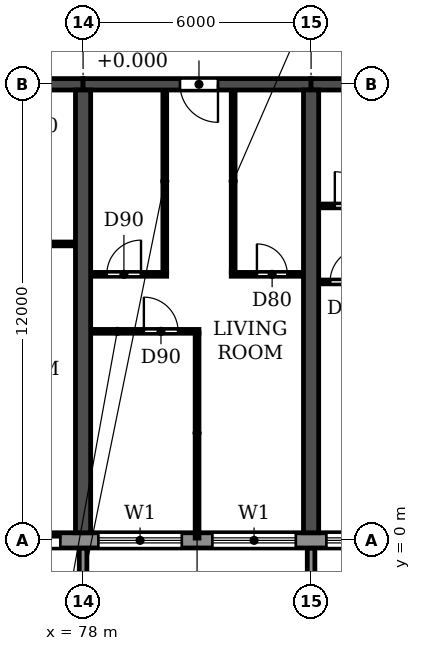
"""IFC4 building model, lengths in metres.
Left out: names, types, materials, properties, quantities, classifications, styles, units other than length and angle.
Written with IfcOpenShell. Run it as: python <this file> out.ifc"""

import sys

from ifc_helpers import new_model, si_unit, direction, frame, frame_2d, origin, place, context, subcontext, project, spatial, polyline, rectangle, outline, extrude, source, transform, mapped, element, fill, save


model = new_model("IFC4")
c1 = context("Model", 3, precision=1e-05, world=origin(), true_north=direction((0.0, 1.0)))
c2 = subcontext(c1, "Body", "Model", "MODEL_VIEW")
j1 = project(units=[si_unit("LENGTHUNIT", "METRE"), si_unit("PLANEANGLEUNIT", "RADIAN")], contexts=[c1])
p1 = place(None, origin())
s1 = spatial("IfcSite", under=j1, at=p1, CompositionType="ELEMENT")
p2 = place(p1, origin())
s2 = spatial("IfcBuilding", under=s1, at=p2, CompositionType="ELEMENT")
p3 = place(p2, frame((0.0, 0.0, 56.4)))
s3 = spatial("IfcBuildingStorey", under=s2, at=p3, CompositionType="ELEMENT", Elevation=56.4)
for number, where, z_axis, x_axis in (
    (1, (78.0, 0.2, 0.0), (0.0, 0.0, 1.0), (0.0, 1.0, 0.0)),
    (2, (84.0, 0.2, 0.0), (0.0, 0.0, 1.0), (0.0, 1.0, 0.0)),
):
    element("IfcWall", number, at=place(p3, frame(where, z_axis=z_axis, x_axis=x_axis)), inside=s3, PredefinedType="SHEAR", context=c2, shape_type="SweptSolid", body=[
        extrude(rectangle(XDim=11.65, YDim=0.4, at=frame_2d((5.825, 0.0))), origin(), (0.0, 0.0, 1.0), 3.05),
    ])
p4 = place(p3, frame((72.0, 12.0, 0.0), z_axis=(0.0, 0.0, 1.0), x_axis=(1.0, 0.0, 0.0)))
e3 = element("IfcWall", 3, at=p4, inside=s3, PredefinedType="SHEAR", context=c2, shape_type="SweptSolid", body=[
    extrude(rectangle(XDim=6.0, YDim=0.3, at=frame_2d((3.0, 0.0))), origin(), (0.0, 0.0, 1.0), 2.45),
])
p5 = place(p4, frame((2.45, 0.0, 0.0)))
e4 = element("IfcOpeningElement", 4, at=p5, cuts=e3, PredefinedType="OPENING", context=c2, shape_type="SweptSolid", body=[
    extrude(rectangle(XDim=1.0, YDim=2.1, at=frame_2d((0.5, 1.05))), frame((0.0, 0.16, 0.0), z_axis=(0.0, -1.0, 0.0), x_axis=(1.0, 0.0, 0.0)), (0.0, 0.0, 1.0), 0.32),
])
p6 = place(p3, frame((78.0, 12.0, 0.0), z_axis=(0.0, 0.0, 1.0), x_axis=(1.0, 0.0, 0.0)))
e5 = element("IfcWall", 5, at=p6, inside=s3, PredefinedType="SHEAR", context=c2, shape_type="SweptSolid", body=[
    extrude(rectangle(XDim=6.0, YDim=0.3, at=frame_2d((3.0, 0.0))), origin(), (0.0, 0.0, 1.0), 2.45),
])
p7 = place(p6, frame((2.55, 0.0, 0.0)))
e6 = element("IfcOpeningElement", 6, at=p7, cuts=e5, PredefinedType="OPENING", context=c2, shape_type="SweptSolid", body=[
    extrude(rectangle(XDim=1.0, YDim=2.1, at=frame_2d((0.5, 1.05))), frame((0.0, 0.16, 0.0), z_axis=(0.0, -1.0, 0.0), x_axis=(1.0, 0.0, 0.0)), (0.0, 0.0, 1.0), 0.32),
])
p8 = place(p3, frame((84.0, 12.0, 0.0), z_axis=(0.0, 0.0, 1.0), x_axis=(1.0, 0.0, 0.0)))
e7 = element("IfcWall", 7, at=p8, inside=s3, PredefinedType="SHEAR", context=c2, shape_type="SweptSolid", body=[
    extrude(rectangle(XDim=6.0, YDim=0.3, at=frame_2d((3.0, 0.0))), origin(), (0.0, 0.0, 1.0), 2.45),
])
p9 = place(p8, frame((2.55, 0.0, 0.0)))
e8 = element("IfcOpeningElement", 8, at=p9, cuts=e7, PredefinedType="OPENING", context=c2, shape_type="SweptSolid", body=[
    extrude(rectangle(XDim=1.0, YDim=2.1, at=frame_2d((0.5, 1.05))), frame((0.0, 0.16, 0.0), z_axis=(0.0, -1.0, 0.0), x_axis=(1.0, 0.0, 0.0)), (0.0, 0.0, 1.0), 0.32),
])
p10 = place(p3, frame((10.683, 0.0, 0.0), z_axis=(0.0, 0.0, 1.0), x_axis=(1.0, 0.0, 0.0)))
e9 = element("IfcWall", 9, at=p10, inside=s3, PredefinedType="STANDARD", context=c2, shape_type="SweptSolid", body=[
    extrude(rectangle(XDim=80.634, YDim=0.4, at=frame_2d((40.317, 0.0))), origin(), (0.0, 0.0, 1.0), 3.05),
])
p11 = place(p10, frame((1.717, 0.0, 0.9)))
e10 = element("IfcOpeningElement", 10, at=p11, cuts=e9, PredefinedType="OPENING", context=c2, shape_type="SweptSolid", body=[
    extrude(rectangle(XDim=2.2, YDim=1.5, at=frame_2d((1.1, 0.75))), frame((0.0, 0.21, 0.0), z_axis=(0.0, -1.0, 0.0), x_axis=(1.0, 0.0, 0.0)), (0.0, 0.0, 1.0), 0.42),
])
p12 = place(p10, frame((4.917, 0.0, 0.0)))
e11 = element("IfcOpeningElement", 11, at=p12, cuts=e9, PredefinedType="OPENING", context=c2, shape_type="SweptSolid", body=[
    extrude(rectangle(XDim=1.8, YDim=2.4, at=frame_2d((0.9, 1.2))), frame((0.0, 0.21, 0.0), z_axis=(0.0, -1.0, 0.0), x_axis=(1.0, 0.0, 0.0)), (0.0, 0.0, 1.0), 0.42),
])
p13 = place(p10, frame((7.717, 0.0, 0.9)))
e12 = element("IfcOpeningElement", 12, at=p13, cuts=e9, PredefinedType="OPENING", context=c2, shape_type="SweptSolid", body=[
    extrude(rectangle(XDim=2.2, YDim=1.5, at=frame_2d((1.1, 0.75))), frame((0.0, 0.21, 0.0), z_axis=(0.0, -1.0, 0.0), x_axis=(1.0, 0.0, 0.0)), (0.0, 0.0, 1.0), 0.42),
])
p14 = place(p10, frame((10.717, 0.0, 0.9)))
e13 = element("IfcOpeningElement", 13, at=p14, cuts=e9, PredefinedType="OPENING", context=c2, shape_type="SweptSolid", body=[
    extrude(rectangle(XDim=2.2, YDim=1.5, at=frame_2d((1.1, 0.75))), frame((0.0, 0.21, 0.0), z_axis=(0.0, -1.0, 0.0), x_axis=(1.0, 0.0, 0.0)), (0.0, 0.0, 1.0), 0.42),
])
p15 = place(p10, frame((13.717, 0.0, 0.9)))
e14 = element("IfcOpeningElement", 14, at=p15, cuts=e9, PredefinedType="OPENING", context=c2, shape_type="SweptSolid", body=[
    extrude(rectangle(XDim=2.2, YDim=1.5, at=frame_2d((1.1, 0.75))), frame((0.0, 0.21, 0.0), z_axis=(0.0, -1.0, 0.0), x_axis=(1.0, 0.0, 0.0)), (0.0, 0.0, 1.0), 0.42),
])
p16 = place(p10, frame((16.917, 0.0, 0.0)))
e15 = element("IfcOpeningElement", 15, at=p16, cuts=e9, PredefinedType="OPENING", context=c2, shape_type="SweptSolid", body=[
    extrude(rectangle(XDim=1.8, YDim=2.4, at=frame_2d((0.9, 1.2))), frame((0.0, 0.21, 0.0), z_axis=(0.0, -1.0, 0.0), x_axis=(1.0, 0.0, 0.0)), (0.0, 0.0, 1.0), 0.42),
])
p17 = place(p10, frame((19.717, 0.0, 0.9)))
e16 = element("IfcOpeningElement", 16, at=p17, cuts=e9, PredefinedType="OPENING", context=c2, shape_type="SweptSolid", body=[
    extrude(rectangle(XDim=2.2, YDim=1.5, at=frame_2d((1.1, 0.75))), frame((0.0, 0.21, 0.0), z_axis=(0.0, -1.0, 0.0), x_axis=(1.0, 0.0, 0.0)), (0.0, 0.0, 1.0), 0.42),
])
p18 = place(p10, frame((22.717, 0.0, 0.9)))
e17 = element("IfcOpeningElement", 17, at=p18, cuts=e9, PredefinedType="OPENING", context=c2, shape_type="SweptSolid", body=[
    extrude(rectangle(XDim=2.2, YDim=1.5, at=frame_2d((1.1, 0.75))), frame((0.0, 0.21, 0.0), z_axis=(0.0, -1.0, 0.0), x_axis=(1.0, 0.0, 0.0)), (0.0, 0.0, 1.0), 0.42),
])
p19 = place(p10, frame((25.917, 0.0, 0.0)))
e18 = element("IfcOpeningElement", 18, at=p19, cuts=e9, PredefinedType="OPENING", context=c2, shape_type="SweptSolid", body=[
    extrude(rectangle(XDim=1.8, YDim=2.4, at=frame_2d((0.9, 1.2))), frame((0.0, 0.21, 0.0), z_axis=(0.0, -1.0, 0.0), x_axis=(1.0, 0.0, 0.0)), (0.0, 0.0, 1.0), 0.42),
])
p20 = place(p10, frame((28.717, 0.0, 0.9)))
e19 = element("IfcOpeningElement", 19, at=p20, cuts=e9, PredefinedType="OPENING", context=c2, shape_type="SweptSolid", body=[
    extrude(rectangle(XDim=2.2, YDim=1.5, at=frame_2d((1.1, 0.75))), frame((0.0, 0.21, 0.0), z_axis=(0.0, -1.0, 0.0), x_axis=(1.0, 0.0, 0.0)), (0.0, 0.0, 1.0), 0.42),
])
p21 = place(p10, frame((31.717, 0.0, 0.9)))
e20 = element("IfcOpeningElement", 20, at=p21, cuts=e9, PredefinedType="OPENING", context=c2, shape_type="SweptSolid", body=[
    extrude(rectangle(XDim=2.2, YDim=1.5, at=frame_2d((1.1, 0.75))), frame((0.0, 0.21, 0.0), z_axis=(0.0, -1.0, 0.0), x_axis=(1.0, 0.0, 0.0)), (0.0, 0.0, 1.0), 0.42),
])
p22 = place(p10, frame((34.717, 0.0, 0.9)))
e21 = element("IfcOpeningElement", 21, at=p22, cuts=e9, PredefinedType="OPENING", context=c2, shape_type="SweptSolid", body=[
    extrude(rectangle(XDim=2.2, YDim=1.5, at=frame_2d((1.1, 0.75))), frame((0.0, 0.21, 0.0), z_axis=(0.0, -1.0, 0.0), x_axis=(1.0, 0.0, 0.0)), (0.0, 0.0, 1.0), 0.42),
])
p23 = place(p10, frame((37.717, 0.0, 0.9)))
e22 = element("IfcOpeningElement", 22, at=p23, cuts=e9, PredefinedType="OPENING", context=c2, shape_type="SweptSolid", body=[
    extrude(rectangle(XDim=2.2, YDim=1.5, at=frame_2d((1.1, 0.75))), frame((0.0, 0.21, 0.0), z_axis=(0.0, -1.0, 0.0), x_axis=(1.0, 0.0, 0.0)), (0.0, 0.0, 1.0), 0.42),
])
p24 = place(p10, frame((40.917, 0.0, 0.0)))
e23 = element("IfcOpeningElement", 23, at=p24, cuts=e9, PredefinedType="OPENING", context=c2, shape_type="SweptSolid", body=[
    extrude(rectangle(XDim=1.8, YDim=2.4, at=frame_2d((0.9, 1.2))), frame((0.0, 0.21, 0.0), z_axis=(0.0, -1.0, 0.0), x_axis=(1.0, 0.0, 0.0)), (0.0, 0.0, 1.0), 0.42),
])
p25 = place(p10, frame((43.717, 0.0, 0.9)))
e24 = element("IfcOpeningElement", 24, at=p25, cuts=e9, PredefinedType="OPENING", context=c2, shape_type="SweptSolid", body=[
    extrude(rectangle(XDim=2.2, YDim=1.5, at=frame_2d((1.1, 0.75))), frame((0.0, 0.21, 0.0), z_axis=(0.0, -1.0, 0.0), x_axis=(1.0, 0.0, 0.0)), (0.0, 0.0, 1.0), 0.42),
])
p26 = place(p10, frame((46.717, 0.0, 0.9)))
e25 = element("IfcOpeningElement", 25, at=p26, cuts=e9, PredefinedType="OPENING", context=c2, shape_type="SweptSolid", body=[
    extrude(rectangle(XDim=2.2, YDim=1.5, at=frame_2d((1.1, 0.75))), frame((0.0, 0.21, 0.0), z_axis=(0.0, -1.0, 0.0), x_axis=(1.0, 0.0, 0.0)), (0.0, 0.0, 1.0), 0.42),
])
p27 = place(p10, frame((49.717, 0.0, 0.9)))
e26 = element("IfcOpeningElement", 26, at=p27, cuts=e9, PredefinedType="OPENING", context=c2, shape_type="SweptSolid", body=[
    extrude(rectangle(XDim=2.2, YDim=1.5, at=frame_2d((1.1, 0.75))), frame((0.0, 0.21, 0.0), z_axis=(0.0, -1.0, 0.0), x_axis=(1.0, 0.0, 0.0)), (0.0, 0.0, 1.0), 0.42),
])
p28 = place(p10, frame((52.717, 0.0, 0.9)))
e27 = element("IfcOpeningElement", 27, at=p28, cuts=e9, PredefinedType="OPENING", context=c2, shape_type="SweptSolid", body=[
    extrude(rectangle(XDim=2.2, YDim=1.5, at=frame_2d((1.1, 0.75))), frame((0.0, 0.21, 0.0), z_axis=(0.0, -1.0, 0.0), x_axis=(1.0, 0.0, 0.0)), (0.0, 0.0, 1.0), 0.42),
])
p29 = place(p10, frame((55.717, 0.0, 0.9)))
e28 = element("IfcOpeningElement", 28, at=p29, cuts=e9, PredefinedType="OPENING", context=c2, shape_type="SweptSolid", body=[
    extrude(rectangle(XDim=2.2, YDim=1.5, at=frame_2d((1.1, 0.75))), frame((0.0, 0.21, 0.0), z_axis=(0.0, -1.0, 0.0), x_axis=(1.0, 0.0, 0.0)), (0.0, 0.0, 1.0), 0.42),
])
p30 = place(p10, frame((58.717, 0.0, 0.9)))
e29 = element("IfcOpeningElement", 29, at=p30, cuts=e9, PredefinedType="OPENING", context=c2, shape_type="SweptSolid", body=[
    extrude(rectangle(XDim=2.2, YDim=1.5, at=frame_2d((1.1, 0.75))), frame((0.0, 0.21, 0.0), z_axis=(0.0, -1.0, 0.0), x_axis=(1.0, 0.0, 0.0)), (0.0, 0.0, 1.0), 0.42),
])
p31 = place(p10, frame((61.717, 0.0, 0.9)))
e30 = element("IfcOpeningElement", 30, at=p31, cuts=e9, PredefinedType="OPENING", context=c2, shape_type="SweptSolid", body=[
    extrude(rectangle(XDim=2.2, YDim=1.5, at=frame_2d((1.1, 0.75))), frame((0.0, 0.21, 0.0), z_axis=(0.0, -1.0, 0.0), x_axis=(1.0, 0.0, 0.0)), (0.0, 0.0, 1.0), 0.42),
])
p32 = place(p10, frame((64.917, 0.0, 0.0)))
e31 = element("IfcOpeningElement", 31, at=p32, cuts=e9, PredefinedType="OPENING", context=c2, shape_type="SweptSolid", body=[
    extrude(rectangle(XDim=1.8, YDim=2.4, at=frame_2d((0.9, 1.2))), frame((0.0, 0.21, 0.0), z_axis=(0.0, -1.0, 0.0), x_axis=(1.0, 0.0, 0.0)), (0.0, 0.0, 1.0), 0.42),
])
p33 = place(p10, frame((67.717, 0.0, 0.9)))
e32 = element("IfcOpeningElement", 32, at=p33, cuts=e9, PredefinedType="OPENING", context=c2, shape_type="SweptSolid", body=[
    extrude(rectangle(XDim=2.2, YDim=1.5, at=frame_2d((1.1, 0.75))), frame((0.0, 0.21, 0.0), z_axis=(0.0, -1.0, 0.0), x_axis=(1.0, 0.0, 0.0)), (0.0, 0.0, 1.0), 0.42),
])
p34 = place(p10, frame((70.717, 0.0, 0.9)))
e33 = element("IfcOpeningElement", 33, at=p34, cuts=e9, PredefinedType="OPENING", context=c2, shape_type="SweptSolid", body=[
    extrude(rectangle(XDim=2.2, YDim=1.5, at=frame_2d((1.1, 0.75))), frame((0.0, 0.21, 0.0), z_axis=(0.0, -1.0, 0.0), x_axis=(1.0, 0.0, 0.0)), (0.0, 0.0, 1.0), 0.42),
])
p35 = place(p10, frame((73.717, 0.0, 0.9)))
e34 = element("IfcOpeningElement", 34, at=p35, cuts=e9, PredefinedType="OPENING", context=c2, shape_type="SweptSolid", body=[
    extrude(rectangle(XDim=2.2, YDim=1.5, at=frame_2d((1.1, 0.75))), frame((0.0, 0.21, 0.0), z_axis=(0.0, -1.0, 0.0), x_axis=(1.0, 0.0, 0.0)), (0.0, 0.0, 1.0), 0.42),
])
p36 = place(p10, frame((76.917, 0.0, 0.0)))
e35 = element("IfcOpeningElement", 35, at=p36, cuts=e9, PredefinedType="OPENING", context=c2, shape_type="SweptSolid", body=[
    extrude(rectangle(XDim=1.8, YDim=2.4, at=frame_2d((0.9, 1.2))), frame((0.0, 0.21, 0.0), z_axis=(0.0, -1.0, 0.0), x_axis=(1.0, 0.0, 0.0)), (0.0, 0.0, 1.0), 0.42),
])
m1 = source(origin(), c2, "Body", "SweptSolid", [
    extrude(outline(polyline([(0.0, 0.0), (0.2, 0.0), (0.2, 1.65), (0.0, 1.65), (0.0, 0.0)])), origin(), (0.0, 0.0, 1.0), 3.1),
])
for number, where in (
    (36, (77.9, -1.85, 0.0)),
    (37, (83.9, -1.85, 0.0)),
):
    element("IfcWall", number, at=place(p3, frame(where)), inside=s3, PredefinedType="STANDARD", context=c2, shape_type="MappedRepresentation", body=[
        mapped(m1, transform((0.0, 0.0, 0.0))),
    ])
p37 = place(p3, frame((78.21, 5.5, 0.0), z_axis=(0.0, 0.0, 1.0), x_axis=(1.0, 0.0, 0.0)))
e38 = element("IfcWall", 38, at=p37, inside=s3, PredefinedType="PARTITIONING", context=c2, shape_type="SweptSolid", body=[
    extrude(rectangle(XDim=2.84, YDim=0.1, at=frame_2d((1.42, 0.0))), origin(), (0.0, 0.0, 1.0), 3.05),
])
p38 = place(p37, frame((1.39, 0.0, 0.0)))
e39 = element("IfcOpeningElement", 39, at=p38, cuts=e38, PredefinedType="OPENING", context=c2, shape_type="SweptSolid", body=[
    extrude(rectangle(XDim=0.9, YDim=2.1, at=frame_2d((0.45, 1.05))), frame((0.0, 0.06, 0.0), z_axis=(0.0, -1.0, 0.0), x_axis=(1.0, 0.0, 0.0)), (0.0, 0.0, 1.0), 0.12),
])
p39 = place(p3, frame((84.21, 6.8, 0.0), z_axis=(0.0, 0.0, 1.0), x_axis=(1.0, 0.0, 0.0)))
e40 = element("IfcWall", 40, at=p39, inside=s3, PredefinedType="PARTITIONING", context=c2, shape_type="SweptSolid", body=[
    extrude(rectangle(XDim=2.84, YDim=0.1, at=frame_2d((1.42, 0.0))), origin(), (0.0, 0.0, 1.0), 3.05),
])
p40 = place(p39, frame((0.29, 0.0, 0.0)))
e41 = element("IfcOpeningElement", 41, at=p40, cuts=e40, PredefinedType="OPENING", context=c2, shape_type="SweptSolid", body=[
    extrude(rectangle(XDim=0.9, YDim=2.1, at=frame_2d((0.45, 1.05))), frame((0.0, 0.06, 0.0), z_axis=(0.0, -1.0, 0.0), x_axis=(1.0, 0.0, 0.0)), (0.0, 0.0, 1.0), 0.12),
])
p41 = place(p3, frame((78.21, 7.0, 0.0), z_axis=(0.0, 0.0, 1.0), x_axis=(1.0, 0.0, 0.0)))
e42 = element("IfcWall", 42, at=p41, inside=s3, PredefinedType="PARTITIONING", context=c2, shape_type="SweptSolid", body=[
    extrude(rectangle(XDim=1.99, YDim=0.1, at=frame_2d((0.995, 0.0))), origin(), (0.0, 0.0, 1.0), 3.05),
])
p42 = place(p41, frame((0.415, 0.0, 0.0)))
e43 = element("IfcOpeningElement", 43, at=p42, cuts=e42, PredefinedType="OPENING", context=c2, shape_type="SweptSolid", body=[
    extrude(rectangle(XDim=0.9, YDim=2.1, at=frame_2d((0.45, 1.05))), frame((0.0, 0.06, 0.0), z_axis=(0.0, -1.0, 0.0), x_axis=(1.0, 0.0, 0.0)), (0.0, 0.0, 1.0), 0.12),
])
p43 = place(p3, frame((81.9, 7.0, 0.0), z_axis=(0.0, 0.0, 1.0), x_axis=(1.0, 0.0, 0.0)))
e44 = element("IfcWall", 44, at=p43, inside=s3, PredefinedType="PARTITIONING", context=c2, shape_type="SweptSolid", body=[
    extrude(rectangle(XDim=1.89, YDim=0.1, at=frame_2d((0.945, 0.0))), origin(), (0.0, 0.0, 1.0), 3.05),
])
p44 = place(p43, frame((0.675, 0.0, 0.0)))
e45 = element("IfcOpeningElement", 45, at=p44, cuts=e44, PredefinedType="OPENING", context=c2, shape_type="SweptSolid", body=[
    extrude(rectangle(XDim=0.8, YDim=2.1, at=frame_2d((0.4, 1.05))), frame((0.0, 0.06, 0.0), z_axis=(0.0, -1.0, 0.0), x_axis=(1.0, 0.0, 0.0)), (0.0, 0.0, 1.0), 0.12),
])
p45 = place(p3, frame((75.8, 7.8, 0.0), z_axis=(0.0, 0.0, 1.0), x_axis=(1.0, 0.0, 0.0)))
e46 = element("IfcWall", 46, at=p45, inside=s3, PredefinedType="PARTITIONING", context=c2, shape_type="SweptSolid", body=[
    extrude(rectangle(XDim=1.99, YDim=0.1, at=frame_2d((0.995, 0.0))), origin(), (0.0, 0.0, 1.0), 3.05),
])
p46 = place(p3, frame((84.21, 8.8, 0.0), z_axis=(0.0, 0.0, 1.0), x_axis=(1.0, 0.0, 0.0)))
e47 = element("IfcWall", 47, at=p46, inside=s3, PredefinedType="PARTITIONING", context=c2, shape_type="SweptSolid", body=[
    extrude(rectangle(XDim=1.99, YDim=0.1, at=frame_2d((0.995, 0.0))), origin(), (0.0, 0.0, 1.0), 3.05),
])
p47 = place(p46, frame((0.415, 0.0, 0.0)))
e48 = element("IfcOpeningElement", 48, at=p47, cuts=e47, PredefinedType="OPENING", context=c2, shape_type="SweptSolid", body=[
    extrude(rectangle(XDim=0.9, YDim=2.1, at=frame_2d((0.45, 1.05))), frame((0.0, 0.06, 0.0), z_axis=(0.0, -1.0, 0.0), x_axis=(1.0, 0.0, 0.0)), (0.0, 0.0, 1.0), 0.12),
])
p48 = place(p3, frame((80.15, 7.05, 0.0), z_axis=(0.0, 0.0, 1.0), x_axis=(0.0, 1.0, 0.0)))
e49 = element("IfcWall", 49, at=p48, inside=s3, PredefinedType="PARTITIONING", context=c2, shape_type="SweptSolid", body=[
    extrude(rectangle(XDim=4.79, YDim=0.1, at=frame_2d((2.395, 0.0))), origin(), (0.0, 0.0, 1.0), 3.05),
])
p49 = place(p3, frame((81.0, 0.06, 0.0), z_axis=(0.0, 0.0, 1.0), x_axis=(0.0, 1.0, 0.0)))
e50 = element("IfcWall", 50, at=p49, inside=s3, PredefinedType="PARTITIONING", context=c2, shape_type="SweptSolid", body=[
    extrude(rectangle(XDim=5.39, YDim=0.1, at=frame_2d((2.695, 0.0))), origin(), (0.0, 0.0, 1.0), 3.05),
])
p50 = place(p3, frame((81.95, 7.05, 0.0), z_axis=(0.0, 0.0, 1.0), x_axis=(0.0, 1.0, 0.0)))
e51 = element("IfcWall", 51, at=p50, inside=s3, PredefinedType="PARTITIONING", context=c2, shape_type="SweptSolid", body=[
    extrude(rectangle(XDim=4.79, YDim=0.1, at=frame_2d((2.395, 0.0))), origin(), (0.0, 0.0, 1.0), 3.05),
])
p51 = place(p32, origin())
e52 = element("IfcDoor", 52, at=p51, inside=s3, OperationType="DOUBLE_DOOR_SLIDING", PredefinedType="DOOR", context=c2, shape_type="SweptSolid", body=[
    extrude(rectangle(XDim=1.8, YDim=2.4, at=frame_2d((0.9, 1.2))), frame((0.0, 0.025, 0.0), z_axis=(0.0, -1.0, 0.0), x_axis=(1.0, 0.0, 0.0)), (0.0, 0.0, 1.0), 0.05),
])
fill(e31, e52)
p52 = place(p33, origin())
e53 = element("IfcWindow", 53, at=p52, inside=s3, PartitioningType="DOUBLE_PANEL_HORIZONTAL", PredefinedType="WINDOW", context=c2, shape_type="SweptSolid", body=[
    extrude(rectangle(XDim=2.2, YDim=1.5, at=frame_2d((1.1, 0.75))), frame((0.0, 0.03, 0.0), z_axis=(0.0, -1.0, 0.0), x_axis=(1.0, 0.0, 0.0)), (0.0, 0.0, 1.0), 0.06),
])
fill(e32, e53)
p53 = place(p34, origin())
e54 = element("IfcWindow", 54, at=p53, inside=s3, PartitioningType="DOUBLE_PANEL_HORIZONTAL", PredefinedType="WINDOW", context=c2, shape_type="SweptSolid", body=[
    extrude(rectangle(XDim=2.2, YDim=1.5, at=frame_2d((1.1, 0.75))), frame((0.0, 0.03, 0.0), z_axis=(0.0, -1.0, 0.0), x_axis=(1.0, 0.0, 0.0)), (0.0, 0.0, 1.0), 0.06),
])
fill(e33, e54)
p54 = place(p35, origin())
e55 = element("IfcWindow", 55, at=p54, inside=s3, PartitioningType="DOUBLE_PANEL_HORIZONTAL", PredefinedType="WINDOW", context=c2, shape_type="SweptSolid", body=[
    extrude(rectangle(XDim=2.2, YDim=1.5, at=frame_2d((1.1, 0.75))), frame((0.0, 0.03, 0.0), z_axis=(0.0, -1.0, 0.0), x_axis=(1.0, 0.0, 0.0)), (0.0, 0.0, 1.0), 0.06),
])
fill(e34, e55)
p55 = place(p42, origin())
e56 = element("IfcDoor", 56, at=p55, inside=s3, OperationType="SINGLE_SWING_RIGHT", PredefinedType="DOOR", context=c2, shape_type="SweptSolid", body=[
    extrude(rectangle(XDim=0.9, YDim=2.1, at=frame_2d((0.45, 1.05))), frame((0.0, 0.025, 0.0), z_axis=(0.0, -1.0, 0.0), x_axis=(1.0, 0.0, 0.0)), (0.0, 0.0, 1.0), 0.05),
])
fill(e43, e56)
p56 = place(p38, origin())
e57 = element("IfcDoor", 57, at=p56, inside=s3, OperationType="SINGLE_SWING_LEFT", PredefinedType="DOOR", context=c2, shape_type="SweptSolid", body=[
    extrude(rectangle(XDim=0.9, YDim=2.1, at=frame_2d((0.45, 1.05))), frame((0.0, 0.025, 0.0), z_axis=(0.0, -1.0, 0.0), x_axis=(1.0, 0.0, 0.0)), (0.0, 0.0, 1.0), 0.05),
])
fill(e39, e57)
p57 = place(p7, frame((1.0, 0.0, 0.0), z_axis=(0.0, 0.0, 1.0), x_axis=(-1.0, 0.0, 0.0)))
e58 = element("IfcDoor", 58, at=p57, inside=s3, OperationType="SINGLE_SWING_LEFT", PredefinedType="DOOR", context=c2, shape_type="SweptSolid", body=[
    extrude(rectangle(XDim=1.0, YDim=2.1, at=frame_2d((0.5, 1.05))), frame((0.0, 0.025, 0.0), z_axis=(0.0, -1.0, 0.0), x_axis=(1.0, 0.0, 0.0)), (0.0, 0.0, 1.0), 0.05),
])
fill(e6, e58)
p58 = place(p44, origin())
e59 = element("IfcDoor", 59, at=p58, inside=s3, OperationType="SINGLE_SWING_LEFT", PredefinedType="DOOR", context=c2, shape_type="SweptSolid", body=[
    extrude(rectangle(XDim=0.8, YDim=2.1, at=frame_2d((0.4, 1.05))), frame((0.0, 0.025, 0.0), z_axis=(0.0, -1.0, 0.0), x_axis=(1.0, 0.0, 0.0)), (0.0, 0.0, 1.0), 0.05),
])
fill(e45, e59)
p59 = place(p40, origin())
e60 = element("IfcDoor", 60, at=p59, inside=s3, OperationType="SINGLE_SWING_RIGHT", PredefinedType="DOOR", context=c2, shape_type="SweptSolid", body=[
    extrude(rectangle(XDim=0.9, YDim=2.1, at=frame_2d((0.45, 1.05))), frame((0.0, 0.025, 0.0), z_axis=(0.0, -1.0, 0.0), x_axis=(1.0, 0.0, 0.0)), (0.0, 0.0, 1.0), 0.05),
])
fill(e41, e60)
p60 = place(p47, origin())
e61 = element("IfcDoor", 61, at=p60, inside=s3, OperationType="SINGLE_SWING_LEFT", PredefinedType="DOOR", context=c2, shape_type="SweptSolid", body=[
    extrude(rectangle(XDim=0.9, YDim=2.1, at=frame_2d((0.45, 1.05))), frame((0.0, 0.025, 0.0), z_axis=(0.0, -1.0, 0.0), x_axis=(1.0, 0.0, 0.0)), (0.0, 0.0, 1.0), 0.05),
])
fill(e48, e61)
save(model, sys.argv[1])
